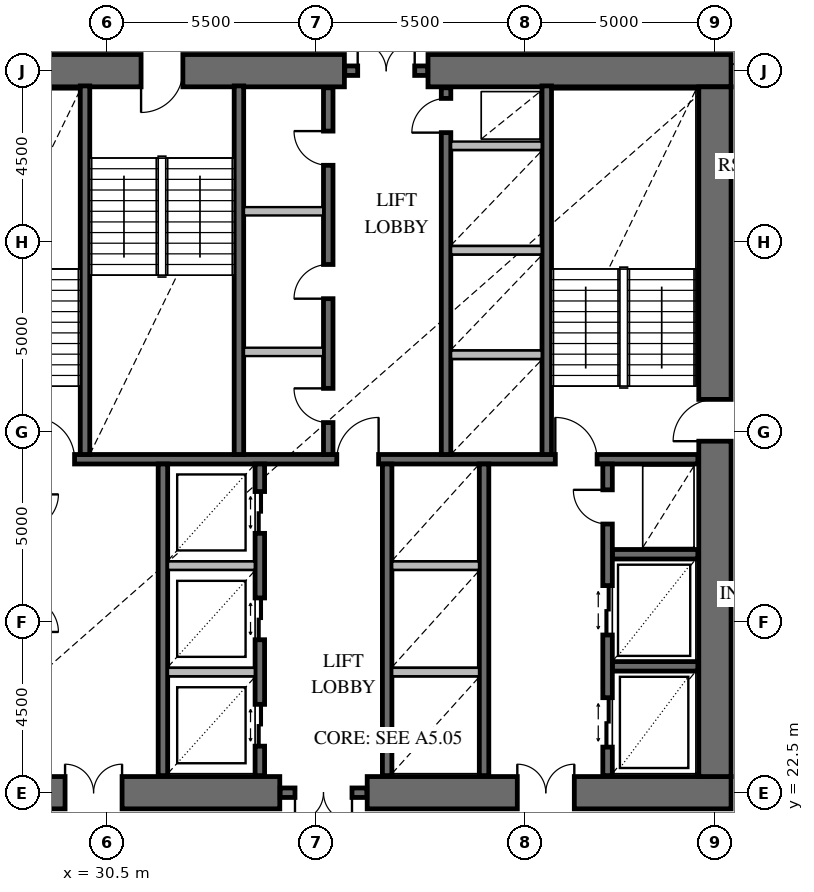
"""IFC4 building model, lengths in metres.
Left out: names, types, materials, properties, quantities, classifications, styles, units other than length and angle.
Written with IfcOpenShell. Run it as: python <this file> out.ifc"""

import sys

from ifc_helpers import new_model, si_unit, direction, frame, frame_2d, origin, place, context, subcontext, project, spatial, rectangle, extrude, element, fill, save


model = new_model("IFC4")
c1 = context("Model", 3, precision=1e-05, world=origin(), true_north=direction((0.0, 1.0)))
c2 = subcontext(c1, "Body", "Model", "MODEL_VIEW")
j1 = project(units=[si_unit("LENGTHUNIT", "METRE"), si_unit("PLANEANGLEUNIT", "RADIAN")], contexts=[c1])
p1 = place(None, origin())
s1 = spatial("IfcSite", under=j1, at=p1, CompositionType="ELEMENT")
p2 = place(p1, origin())
s2 = spatial("IfcBuilding", under=s1, at=p2, CompositionType="ELEMENT")
p3 = place(p2, frame((0.0, 0.0, 83.4)))
s3 = spatial("IfcBuildingStorey", under=s2, at=p3, CompositionType="ELEMENT", Elevation=83.4)
p4 = place(p3, frame((25.075, 22.5, 0.0), z_axis=(0.0, 0.0, 1.0), x_axis=(1.0, 0.0, 0.0)))
e1 = element("IfcWall", 1, at=p4, inside=s3, PredefinedType="SHEAR", context=c2, shape_type="SweptSolid", body=[
    extrude(rectangle(XDim=9.975, YDim=0.85, at=frame_2d((4.988, 0.0))), origin(), (0.0, 0.0, 1.0), 4.2),
])
p5 = place(p4, frame((4.325, 0.0, 0.0)))
e2 = element("IfcOpeningElement", 2, at=p5, cuts=e1, PredefinedType="OPENING", context=c2, shape_type="SweptSolid", body=[
    extrude(rectangle(XDim=1.5, YDim=2.15, at=frame_2d((0.75, 1.075))), frame((0.0, 0.437, 0.0), z_axis=(0.0, -1.0, 0.0), x_axis=(1.0, 0.0, 0.0)), (0.0, 0.0, 1.0), 0.874),
])
p6 = place(p3, frame((37.35, 22.5, 0.0), z_axis=(0.0, 0.0, 1.0), x_axis=(1.0, 0.0, 0.0)))
e3 = element("IfcWall", 3, at=p6, inside=s3, PredefinedType="SHEAR", context=c2, shape_type="SweptSolid", body=[
    extrude(rectangle(XDim=9.575, YDim=0.85, at=frame_2d((4.788, 0.0))), origin(), (0.0, 0.0, 1.0), 4.2),
])
p7 = place(p6, frame((3.95, 0.0, 0.0)))
e4 = element("IfcOpeningElement", 4, at=p7, cuts=e3, PredefinedType="OPENING", context=c2, shape_type="SweptSolid", body=[
    extrude(rectangle(XDim=1.5, YDim=2.15, at=frame_2d((0.75, 1.075))), frame((0.0, 0.437, 0.0), z_axis=(0.0, -1.0, 0.0), x_axis=(1.0, 0.0, 0.0)), (0.0, 0.0, 1.0), 0.874),
])
p8 = place(p3, frame((46.925, 41.5, 0.0), z_axis=(0.0, 0.0, 1.0), x_axis=(-1.0, 0.0, 0.0)))
e5 = element("IfcWall", 5, at=p8, inside=s3, PredefinedType="SHEAR", context=c2, shape_type="SweptSolid", body=[
    extrude(rectangle(XDim=7.975, YDim=0.85, at=frame_2d((3.988, 0.0))), origin(), (0.0, 0.0, 1.0), 4.2),
])
p9 = place(p3, frame((36.75, 41.5, 0.0), z_axis=(0.0, 0.0, 1.0), x_axis=(-1.0, 0.0, 0.0)))
e6 = element("IfcWall", 6, at=p9, inside=s3, PredefinedType="SHEAR", context=c2, shape_type="SweptSolid", body=[
    extrude(rectangle(XDim=11.675, YDim=0.85, at=frame_2d((5.837, 0.0))), origin(), (0.0, 0.0, 1.0), 4.2),
])
p10 = place(p9, frame((4.25, 0.0, 0.0)))
e7 = element("IfcOpeningElement", 7, at=p10, cuts=e6, PredefinedType="OPENING", context=c2, shape_type="SweptSolid", body=[
    extrude(rectangle(XDim=1.1, YDim=2.15, at=frame_2d((0.55, 1.075))), frame((0.0, 0.437, 0.0), z_axis=(0.0, -1.0, 0.0), x_axis=(1.0, 0.0, 0.0)), (0.0, 0.0, 1.0), 0.874),
])
p11 = place(p3, frame((46.5, 22.925, 0.0), z_axis=(0.0, 0.0, 1.0), x_axis=(0.0, 1.0, 0.0)))
e8 = element("IfcWall", 8, at=p11, inside=s3, PredefinedType="SHEAR", context=c2, shape_type="SweptSolid", body=[
    extrude(rectangle(XDim=18.15, YDim=0.85, at=frame_2d((9.075, 0.0))), origin(), (0.0, 0.0, 1.0), 4.2),
])
p12 = place(p11, frame((8.825, 0.0, 0.0)))
e9 = element("IfcOpeningElement", 9, at=p12, cuts=e8, PredefinedType="OPENING", context=c2, shape_type="SweptSolid", body=[
    extrude(rectangle(XDim=1.1, YDim=2.15, at=frame_2d((0.55, 1.075))), frame((0.0, 0.437, 0.0), z_axis=(0.0, -1.0, 0.0), x_axis=(1.0, 0.0, 0.0)), (0.0, 0.0, 1.0), 0.874),
])
p13 = place(p3, frame((35.06, 22.5, 0.0), z_axis=(0.0, 0.0, 1.0), x_axis=(1.0, 0.0, 0.0)))
e10 = element("IfcWall", 10, at=p13, inside=s3, PredefinedType="SOLIDWALL", context=c2, shape_type="SweptSolid", body=[
    extrude(rectangle(XDim=2.28, YDim=0.25, at=frame_2d((1.14, 0.0))), origin(), (0.0, 0.0, 1.0), 4.2),
])
p14 = place(p13, frame((0.39, 0.0, 0.0)))
e11 = element("IfcOpeningElement", 11, at=p14, cuts=e10, PredefinedType="OPENING", context=c2, shape_type="SweptSolid", body=[
    extrude(rectangle(XDim=1.5, YDim=2.15, at=frame_2d((0.75, 1.075))), frame((0.0, 0.137, 0.0), z_axis=(0.0, -1.0, 0.0), x_axis=(1.0, 0.0, 0.0)), (0.0, 0.0, 1.0), 0.274),
])
p15 = place(p3, frame((36.76, 41.5, 0.0), z_axis=(0.0, 0.0, 1.0), x_axis=(1.0, 0.0, 0.0)))
e12 = element("IfcWall", 12, at=p15, inside=s3, PredefinedType="SOLIDWALL", context=c2, shape_type="SweptSolid", body=[
    extrude(rectangle(XDim=2.18, YDim=0.25, at=frame_2d((1.09, 0.0))), origin(), (0.0, 0.0, 1.0), 4.2),
])
p16 = place(p15, frame((0.34, 0.0, 0.0)))
e13 = element("IfcOpeningElement", 13, at=p16, cuts=e12, PredefinedType="OPENING", context=c2, shape_type="SweptSolid", body=[
    extrude(rectangle(XDim=1.5, YDim=2.15, at=frame_2d((0.75, 1.075))), frame((0.0, 0.137, 0.0), z_axis=(0.0, -1.0, 0.0), x_axis=(1.0, 0.0, 0.0)), (0.0, 0.0, 1.0), 0.274),
])
p17 = place(p3, frame((25.95, 31.275, 0.0), z_axis=(0.0, 0.0, 1.0), x_axis=(1.0, 0.0, 0.0)))
e14 = element("IfcWall", 14, at=p17, inside=s3, PredefinedType="SOLIDWALL", context=c2, shape_type="SweptSolid", body=[
    extrude(rectangle(XDim=20.1, YDim=0.25, at=frame_2d((10.05, 0.0))), origin(), (0.0, 0.0, 1.0), 4.2),
])
p18 = place(p17, frame((2.6, 0.0, 0.0)))
e15 = element("IfcOpeningElement", 15, at=p18, cuts=e14, PredefinedType="OPENING", context=c2, shape_type="SweptSolid", body=[
    extrude(rectangle(XDim=1.1, YDim=2.15, at=frame_2d((0.55, 1.075))), frame((0.0, 0.137, 0.0), z_axis=(0.0, -1.0, 0.0), x_axis=(1.0, 0.0, 0.0)), (0.0, 0.0, 1.0), 0.274),
])
p19 = place(p17, frame((10.6, 0.0, 0.0)))
e16 = element("IfcOpeningElement", 16, at=p19, cuts=e14, PredefinedType="OPENING", context=c2, shape_type="SweptSolid", body=[
    extrude(rectangle(XDim=1.1, YDim=2.15, at=frame_2d((0.55, 1.075))), frame((0.0, 0.137, 0.0), z_axis=(0.0, -1.0, 0.0), x_axis=(1.0, 0.0, 0.0)), (0.0, 0.0, 1.0), 0.274),
])
p20 = place(p17, frame((16.35, 0.0, 0.0)))
e17 = element("IfcOpeningElement", 17, at=p20, cuts=e14, PredefinedType="OPENING", context=c2, shape_type="SweptSolid", body=[
    extrude(rectangle(XDim=1.1, YDim=2.15, at=frame_2d((0.55, 1.075))), frame((0.0, 0.137, 0.0), z_axis=(0.0, -1.0, 0.0), x_axis=(1.0, 0.0, 0.0)), (0.0, 0.0, 1.0), 0.274),
])
for number, where, z_axis, x_axis in (
    (18, (29.925, 31.4, 0.0), (0.0, 0.0, 1.0), (0.0, 1.0, 0.0)),
    (19, (33.975, 31.4, 0.0), (0.0, 0.0, 1.0), (0.0, 1.0, 0.0)),
    (20, (42.075, 31.4, 0.0), (0.0, 0.0, 1.0), (0.0, 1.0, 0.0)),
):
    element("IfcWall", number, at=place(p3, frame(where, z_axis=z_axis, x_axis=x_axis)), inside=s3, PredefinedType="SOLIDWALL", context=c2, shape_type="SweptSolid", body=[
        extrude(rectangle(XDim=9.7, YDim=0.25, at=frame_2d((4.85, 0.0))), origin(), (0.0, 0.0, 1.0), 4.2),
    ])
p21 = place(p3, frame((36.325, 31.4, 0.0), z_axis=(0.0, 0.0, 1.0), x_axis=(0.0, 1.0, 0.0)))
e21 = element("IfcWall", 21, at=p21, inside=s3, PredefinedType="SOLIDWALL", context=c2, shape_type="SweptSolid", body=[
    extrude(rectangle(XDim=9.65, YDim=0.25, at=frame_2d((4.825, 0.0))), origin(), (0.0, 0.0, 1.0), 4.2),
])
p22 = place(p21, frame((0.84, 0.0, 0.0)))
e22 = element("IfcOpeningElement", 22, at=p22, cuts=e21, PredefinedType="OPENING", context=c2, shape_type="SweptSolid", body=[
    extrude(rectangle(XDim=0.9, YDim=2.1, at=frame_2d((0.45, 1.05))), frame((0.0, 0.137, 0.0), z_axis=(0.0, -1.0, 0.0), x_axis=(1.0, 0.0, 0.0)), (0.0, 0.0, 1.0), 0.274),
])
p23 = place(p21, frame((4.1, 0.0, 0.0)))
e23 = element("IfcOpeningElement", 23, at=p23, cuts=e21, PredefinedType="OPENING", context=c2, shape_type="SweptSolid", body=[
    extrude(rectangle(XDim=0.9, YDim=2.1, at=frame_2d((0.45, 1.05))), frame((0.0, 0.137, 0.0), z_axis=(0.0, -1.0, 0.0), x_axis=(1.0, 0.0, 0.0)), (0.0, 0.0, 1.0), 0.274),
])
p24 = place(p21, frame((7.61, 0.0, 0.0)))
e24 = element("IfcOpeningElement", 24, at=p24, cuts=e21, PredefinedType="OPENING", context=c2, shape_type="SweptSolid", body=[
    extrude(rectangle(XDim=0.9, YDim=2.1, at=frame_2d((0.45, 1.05))), frame((0.0, 0.137, 0.0), z_axis=(0.0, -1.0, 0.0), x_axis=(1.0, 0.0, 0.0)), (0.0, 0.0, 1.0), 0.274),
])
p25 = place(p3, frame((39.425, 31.4, 0.0), z_axis=(0.0, 0.0, 1.0), x_axis=(0.0, 1.0, 0.0)))
e25 = element("IfcWall", 25, at=p25, inside=s3, PredefinedType="SOLIDWALL", context=c2, shape_type="SweptSolid", body=[
    extrude(rectangle(XDim=9.65, YDim=0.25, at=frame_2d((4.825, 0.0))), origin(), (0.0, 0.0, 1.0), 4.2),
])
p26 = place(p25, frame((8.47, 0.0, 0.0)))
e26 = element("IfcOpeningElement", 26, at=p26, cuts=e25, PredefinedType="OPENING", context=c2, shape_type="SweptSolid", body=[
    extrude(rectangle(XDim=0.9, YDim=2.1, at=frame_2d((0.45, 1.05))), frame((0.0, 0.137, 0.0), z_axis=(0.0, -1.0, 0.0), x_axis=(1.0, 0.0, 0.0)), (0.0, 0.0, 1.0), 0.274),
])
p27 = place(p3, frame((31.975, 22.95, 0.0), z_axis=(0.0, 0.0, 1.0), x_axis=(0.0, 1.0, 0.0)))
e27 = element("IfcWall", 27, at=p27, inside=s3, PredefinedType="SOLIDWALL", context=c2, shape_type="SweptSolid", body=[
    extrude(rectangle(XDim=8.2, YDim=0.25, at=frame_2d((4.1, 0.0))), origin(), (0.0, 0.0, 1.0), 4.2),
])
p28 = place(p3, frame((34.525, 22.95, 0.0), z_axis=(0.0, 0.0, 1.0), x_axis=(0.0, 1.0, 0.0)))
e28 = element("IfcWall", 28, at=p28, inside=s3, PredefinedType="SOLIDWALL", context=c2, shape_type="SweptSolid", body=[
    extrude(rectangle(XDim=8.2, YDim=0.25, at=frame_2d((4.1, 0.0))), origin(), (0.0, 0.0, 1.0), 4.2),
])
p29 = place(p28, frame((0.775, 0.0, 0.0)))
e29 = element("IfcOpeningElement", 29, at=p29, cuts=e28, PredefinedType="OPENING", context=c2, shape_type="SweptSolid", body=[
    extrude(rectangle(XDim=1.1, YDim=2.2, at=frame_2d((0.55, 1.1))), frame((0.0, 0.137, 0.0), z_axis=(0.0, -1.0, 0.0), x_axis=(1.0, 0.0, 0.0)), (0.0, 0.0, 1.0), 0.274),
])
p30 = place(p28, frame((3.575, 0.0, 0.0)))
e30 = element("IfcOpeningElement", 30, at=p30, cuts=e28, PredefinedType="OPENING", context=c2, shape_type="SweptSolid", body=[
    extrude(rectangle(XDim=1.1, YDim=2.2, at=frame_2d((0.55, 1.1))), frame((0.0, 0.137, 0.0), z_axis=(0.0, -1.0, 0.0), x_axis=(1.0, 0.0, 0.0)), (0.0, 0.0, 1.0), 0.274),
])
p31 = place(p28, frame((6.375, 0.0, 0.0)))
e31 = element("IfcOpeningElement", 31, at=p31, cuts=e28, PredefinedType="OPENING", context=c2, shape_type="SweptSolid", body=[
    extrude(rectangle(XDim=1.1, YDim=2.2, at=frame_2d((0.55, 1.1))), frame((0.0, 0.137, 0.0), z_axis=(0.0, -1.0, 0.0), x_axis=(1.0, 0.0, 0.0)), (0.0, 0.0, 1.0), 0.274),
])
for number, where, z_axis, x_axis in (
    (32, (37.875, 22.95, 0.0), (0.0, 0.0, 1.0), (0.0, 1.0, 0.0)),
    (33, (40.425, 22.95, 0.0), (0.0, 0.0, 1.0), (0.0, 1.0, 0.0)),
):
    element("IfcWall", number, at=place(p3, frame(where, z_axis=z_axis, x_axis=x_axis)), inside=s3, PredefinedType="SOLIDWALL", context=c2, shape_type="SweptSolid", body=[
        extrude(rectangle(XDim=8.2, YDim=0.25, at=frame_2d((4.1, 0.0))), origin(), (0.0, 0.0, 1.0), 4.2),
    ])
for number, where, z_axis, x_axis in (
    (34, (43.8, 25.825, 0.0), (0.0, 0.0, 1.0), (1.0, 0.0, 0.0)),
    (35, (43.8, 28.775, 0.0), (0.0, 0.0, 1.0), (1.0, 0.0, 0.0)),
):
    element("IfcWall", number, at=place(p3, frame(where, z_axis=z_axis, x_axis=x_axis)), inside=s3, PredefinedType="SOLIDWALL", context=c2, shape_type="SweptSolid", body=[
        extrude(rectangle(XDim=2.25, YDim=0.25, at=frame_2d((1.125, 0.0))), origin(), (0.0, 0.0, 1.0), 4.2),
    ])
p32 = place(p3, frame((43.675, 22.95, 0.0), z_axis=(0.0, 0.0, 1.0), x_axis=(0.0, 1.0, 0.0)))
e36 = element("IfcWall", 36, at=p32, inside=s3, PredefinedType="SOLIDWALL", context=c2, shape_type="SweptSolid", body=[
    extrude(rectangle(XDim=8.2, YDim=0.25, at=frame_2d((4.1, 0.0))), origin(), (0.0, 0.0, 1.0), 4.2),
])
p33 = place(p32, frame((0.75, 0.0, 0.0)))
e37 = element("IfcOpeningElement", 37, at=p33, cuts=e36, PredefinedType="OPENING", context=c2, shape_type="SweptSolid", body=[
    extrude(rectangle(XDim=1.3, YDim=2.3, at=frame_2d((0.65, 1.15))), frame((0.0, 0.137, 0.0), z_axis=(0.0, -1.0, 0.0), x_axis=(1.0, 0.0, 0.0)), (0.0, 0.0, 1.0), 0.274),
])
p34 = place(p32, frame((3.7, 0.0, 0.0)))
e38 = element("IfcOpeningElement", 38, at=p34, cuts=e36, PredefinedType="OPENING", context=c2, shape_type="SweptSolid", body=[
    extrude(rectangle(XDim=1.3, YDim=2.3, at=frame_2d((0.65, 1.15))), frame((0.0, 0.137, 0.0), z_axis=(0.0, -1.0, 0.0), x_axis=(1.0, 0.0, 0.0)), (0.0, 0.0, 1.0), 0.274),
])
p35 = place(p32, frame((6.62, 0.0, 0.0)))
e39 = element("IfcOpeningElement", 39, at=p35, cuts=e36, PredefinedType="OPENING", context=c2, shape_type="SweptSolid", body=[
    extrude(rectangle(XDim=0.9, YDim=2.1, at=frame_2d((0.45, 1.05))), frame((0.0, 0.137, 0.0), z_axis=(0.0, -1.0, 0.0), x_axis=(1.0, 0.0, 0.0)), (0.0, 0.0, 1.0), 0.274),
])
for number, where, z_axis, x_axis in (
    (40, (34.108, 34.1, 0.0), (0.0, 0.0, 1.0), (1.0, 0.0, 0.0)),
    (41, (34.108, 37.8, 0.0), (0.0, 0.0, 1.0), (1.0, 0.0, 0.0)),
):
    element("IfcWall", number, at=place(p3, frame(where, z_axis=z_axis, x_axis=x_axis)), inside=s3, PredefinedType="PARTITIONING", context=c2, shape_type="SweptSolid", body=[
        extrude(rectangle(XDim=2.084, YDim=0.22, at=frame_2d((1.042, 0.0))), origin(), (0.0, 0.0, 1.0), 3.85),
    ])
for number, where, z_axis, x_axis in (
    (42, (39.558, 34.025, 0.0), (0.0, 0.0, 1.0), (1.0, 0.0, 0.0)),
    (43, (39.558, 36.775, 0.0), (0.0, 0.0, 1.0), (1.0, 0.0, 0.0)),
    (44, (39.558, 39.525, 0.0), (0.0, 0.0, 1.0), (1.0, 0.0, 0.0)),
):
    element("IfcWall", number, at=place(p3, frame(where, z_axis=z_axis, x_axis=x_axis)), inside=s3, PredefinedType="PARTITIONING", context=c2, shape_type="SweptSolid", body=[
        extrude(rectangle(XDim=2.384, YDim=0.22, at=frame_2d((1.192, 0.0))), origin(), (0.0, 0.0, 1.0), 3.85),
    ])
for number, where, z_axis, x_axis in (
    (45, (32.108, 25.675, 0.0), (0.0, 0.0, 1.0), (1.0, 0.0, 0.0)),
    (46, (32.108, 28.475, 0.0), (0.0, 0.0, 1.0), (1.0, 0.0, 0.0)),
):
    element("IfcWall", number, at=place(p3, frame(where, z_axis=z_axis, x_axis=x_axis)), inside=s3, PredefinedType="PARTITIONING", context=c2, shape_type="SweptSolid", body=[
        extrude(rectangle(XDim=2.284, YDim=0.22, at=frame_2d((1.142, 0.0))), origin(), (0.0, 0.0, 1.0), 3.85),
    ])
for number, where, z_axis, x_axis in (
    (47, (38.008, 25.675, 0.0), (0.0, 0.0, 1.0), (1.0, 0.0, 0.0)),
    (48, (38.008, 28.475, 0.0), (0.0, 0.0, 1.0), (1.0, 0.0, 0.0)),
):
    element("IfcWall", number, at=place(p3, frame(where, z_axis=z_axis, x_axis=x_axis)), inside=s3, PredefinedType="PARTITIONING", context=c2, shape_type="SweptSolid", body=[
        extrude(rectangle(XDim=2.284, YDim=0.22, at=frame_2d((1.142, 0.0))), origin(), (0.0, 0.0, 1.0), 3.85),
    ])
p36 = place(p12, origin())
e49 = element("IfcDoor", 49, at=p36, inside=s3, OperationType="SINGLE_SWING_LEFT", PredefinedType="USERDEFINED", context=c2, shape_type="SweptSolid", body=[
    extrude(rectangle(XDim=1.1, YDim=2.15, at=frame_2d((0.55, 1.075))), frame((0.0, 0.025, 0.0), z_axis=(0.0, -1.0, 0.0), x_axis=(1.0, 0.0, 0.0)), (0.0, 0.0, 1.0), 0.05),
])
fill(e9, e49)
p37 = place(p10, origin())
e50 = element("IfcDoor", 50, at=p37, inside=s3, OperationType="SINGLE_SWING_RIGHT", PredefinedType="USERDEFINED", context=c2, shape_type="SweptSolid", body=[
    extrude(rectangle(XDim=1.1, YDim=2.15, at=frame_2d((0.55, 1.075))), frame((0.0, 0.025, 0.0), z_axis=(0.0, -1.0, 0.0), x_axis=(1.0, 0.0, 0.0)), (0.0, 0.0, 1.0), 0.05),
])
fill(e7, e50)
p38 = place(p5, origin())
e51 = element("IfcDoor", 51, at=p38, inside=s3, OperationType="DOUBLE_DOOR_SINGLE_SWING", PredefinedType="DOOR", context=c2, shape_type="SweptSolid", body=[
    extrude(rectangle(XDim=1.5, YDim=2.15, at=frame_2d((0.75, 1.075))), frame((0.0, 0.025, 0.0), z_axis=(0.0, -1.0, 0.0), x_axis=(1.0, 0.0, 0.0)), (0.0, 0.0, 1.0), 0.05),
])
fill(e2, e51)
p39 = place(p7, origin())
e52 = element("IfcDoor", 52, at=p39, inside=s3, OperationType="DOUBLE_DOOR_SINGLE_SWING", PredefinedType="DOOR", context=c2, shape_type="SweptSolid", body=[
    extrude(rectangle(XDim=1.5, YDim=2.15, at=frame_2d((0.75, 1.075))), frame((0.0, 0.025, 0.0), z_axis=(0.0, -1.0, 0.0), x_axis=(1.0, 0.0, 0.0)), (0.0, 0.0, 1.0), 0.05),
])
fill(e4, e52)
p40 = place(p14, frame((1.5, 0.0, 0.0), z_axis=(0.0, 0.0, 1.0), x_axis=(-1.0, 0.0, 0.0)))
e53 = element("IfcDoor", 53, at=p40, inside=s3, OperationType="DOUBLE_DOOR_SINGLE_SWING", PredefinedType="DOOR", context=c2, shape_type="SweptSolid", body=[
    extrude(rectangle(XDim=1.5, YDim=2.15, at=frame_2d((0.75, 1.075))), frame((0.0, 0.025, 0.0), z_axis=(0.0, -1.0, 0.0), x_axis=(1.0, 0.0, 0.0)), (0.0, 0.0, 1.0), 0.05),
])
fill(e11, e53)
p41 = place(p16, origin())
e54 = element("IfcDoor", 54, at=p41, inside=s3, OperationType="DOUBLE_DOOR_SINGLE_SWING", PredefinedType="DOOR", context=c2, shape_type="SweptSolid", body=[
    extrude(rectangle(XDim=1.5, YDim=2.15, at=frame_2d((0.75, 1.075))), frame((0.0, 0.025, 0.0), z_axis=(0.0, -1.0, 0.0), x_axis=(1.0, 0.0, 0.0)), (0.0, 0.0, 1.0), 0.05),
])
fill(e13, e54)
p42 = place(p18, origin())
e55 = element("IfcDoor", 55, at=p42, inside=s3, OperationType="SINGLE_SWING_LEFT", PredefinedType="USERDEFINED", context=c2, shape_type="SweptSolid", body=[
    extrude(rectangle(XDim=1.1, YDim=2.15, at=frame_2d((0.55, 1.075))), frame((0.0, 0.025, 0.0), z_axis=(0.0, -1.0, 0.0), x_axis=(1.0, 0.0, 0.0)), (0.0, 0.0, 1.0), 0.05),
])
fill(e15, e55)
p43 = place(p19, origin())
e56 = element("IfcDoor", 56, at=p43, inside=s3, OperationType="SINGLE_SWING_RIGHT", PredefinedType="USERDEFINED", context=c2, shape_type="SweptSolid", body=[
    extrude(rectangle(XDim=1.1, YDim=2.15, at=frame_2d((0.55, 1.075))), frame((0.0, 0.025, 0.0), z_axis=(0.0, -1.0, 0.0), x_axis=(1.0, 0.0, 0.0)), (0.0, 0.0, 1.0), 0.05),
])
fill(e16, e56)
p44 = place(p20, origin())
e57 = element("IfcDoor", 57, at=p44, inside=s3, OperationType="SINGLE_SWING_LEFT", PredefinedType="USERDEFINED", context=c2, shape_type="SweptSolid", body=[
    extrude(rectangle(XDim=1.1, YDim=2.15, at=frame_2d((0.55, 1.075))), frame((0.0, 0.025, 0.0), z_axis=(0.0, -1.0, 0.0), x_axis=(1.0, 0.0, 0.0)), (0.0, 0.0, 1.0), 0.05),
])
fill(e17, e57)
p45 = place(p22, origin())
e58 = element("IfcDoor", 58, at=p45, inside=s3, OperationType="SINGLE_SWING_RIGHT", PredefinedType="DOOR", context=c2, shape_type="SweptSolid", body=[
    extrude(rectangle(XDim=0.9, YDim=2.1, at=frame_2d((0.45, 1.05))), frame((0.0, 0.025, 0.0), z_axis=(0.0, -1.0, 0.0), x_axis=(1.0, 0.0, 0.0)), (0.0, 0.0, 1.0), 0.05),
])
fill(e22, e58)
p46 = place(p23, origin())
e59 = element("IfcDoor", 59, at=p46, inside=s3, OperationType="SINGLE_SWING_LEFT", PredefinedType="DOOR", context=c2, shape_type="SweptSolid", body=[
    extrude(rectangle(XDim=0.9, YDim=2.1, at=frame_2d((0.45, 1.05))), frame((0.0, 0.025, 0.0), z_axis=(0.0, -1.0, 0.0), x_axis=(1.0, 0.0, 0.0)), (0.0, 0.0, 1.0), 0.05),
])
fill(e23, e59)
p47 = place(p24, origin())
e60 = element("IfcDoor", 60, at=p47, inside=s3, OperationType="SINGLE_SWING_RIGHT", PredefinedType="DOOR", context=c2, shape_type="SweptSolid", body=[
    extrude(rectangle(XDim=0.9, YDim=2.1, at=frame_2d((0.45, 1.05))), frame((0.0, 0.025, 0.0), z_axis=(0.0, -1.0, 0.0), x_axis=(1.0, 0.0, 0.0)), (0.0, 0.0, 1.0), 0.05),
])
fill(e24, e60)
p48 = place(p26, origin())
e61 = element("IfcDoor", 61, at=p48, inside=s3, OperationType="SINGLE_SWING_LEFT", PredefinedType="DOOR", context=c2, shape_type="SweptSolid", body=[
    extrude(rectangle(XDim=0.9, YDim=2.1, at=frame_2d((0.45, 1.05))), frame((0.0, 0.025, 0.0), z_axis=(0.0, -1.0, 0.0), x_axis=(1.0, 0.0, 0.0)), (0.0, 0.0, 1.0), 0.05),
])
fill(e26, e61)
p49 = place(p29, frame((1.1, 0.0, 0.0), z_axis=(0.0, 0.0, 1.0), x_axis=(-1.0, 0.0, 0.0)))
e62 = element("IfcDoor", 62, at=p49, inside=s3, OperationType="DOUBLE_DOOR_SLIDING", PredefinedType="DOOR", context=c2, shape_type="SweptSolid", body=[
    extrude(rectangle(XDim=1.1, YDim=2.2, at=frame_2d((0.55, 1.1))), frame((0.0, 0.025, 0.0), z_axis=(0.0, -1.0, 0.0), x_axis=(1.0, 0.0, 0.0)), (0.0, 0.0, 1.0), 0.05),
])
fill(e29, e62)
p50 = place(p30, frame((1.1, 0.0, 0.0), z_axis=(0.0, 0.0, 1.0), x_axis=(-1.0, 0.0, 0.0)))
e63 = element("IfcDoor", 63, at=p50, inside=s3, OperationType="DOUBLE_DOOR_SLIDING", PredefinedType="DOOR", context=c2, shape_type="SweptSolid", body=[
    extrude(rectangle(XDim=1.1, YDim=2.2, at=frame_2d((0.55, 1.1))), frame((0.0, 0.025, 0.0), z_axis=(0.0, -1.0, 0.0), x_axis=(1.0, 0.0, 0.0)), (0.0, 0.0, 1.0), 0.05),
])
fill(e30, e63)
p51 = place(p31, frame((1.1, 0.0, 0.0), z_axis=(0.0, 0.0, 1.0), x_axis=(-1.0, 0.0, 0.0)))
e64 = element("IfcDoor", 64, at=p51, inside=s3, OperationType="DOUBLE_DOOR_SLIDING", PredefinedType="DOOR", context=c2, shape_type="SweptSolid", body=[
    extrude(rectangle(XDim=1.1, YDim=2.2, at=frame_2d((0.55, 1.1))), frame((0.0, 0.025, 0.0), z_axis=(0.0, -1.0, 0.0), x_axis=(1.0, 0.0, 0.0)), (0.0, 0.0, 1.0), 0.05),
])
fill(e31, e64)
p52 = place(p33, origin())
e65 = element("IfcDoor", 65, at=p52, inside=s3, OperationType="DOUBLE_DOOR_SLIDING", PredefinedType="DOOR", context=c2, shape_type="SweptSolid", body=[
    extrude(rectangle(XDim=1.3, YDim=2.3, at=frame_2d((0.65, 1.15))), frame((0.0, 0.025, 0.0), z_axis=(0.0, -1.0, 0.0), x_axis=(1.0, 0.0, 0.0)), (0.0, 0.0, 1.0), 0.05),
])
fill(e37, e65)
p53 = place(p34, origin())
e66 = element("IfcDoor", 66, at=p53, inside=s3, OperationType="DOUBLE_DOOR_SLIDING", PredefinedType="DOOR", context=c2, shape_type="SweptSolid", body=[
    extrude(rectangle(XDim=1.3, YDim=2.3, at=frame_2d((0.65, 1.15))), frame((0.0, 0.025, 0.0), z_axis=(0.0, -1.0, 0.0), x_axis=(1.0, 0.0, 0.0)), (0.0, 0.0, 1.0), 0.05),
])
fill(e38, e66)
p54 = place(p35, origin())
e67 = element("IfcDoor", 67, at=p54, inside=s3, OperationType="SINGLE_SWING_RIGHT", PredefinedType="DOOR", context=c2, shape_type="SweptSolid", body=[
    extrude(rectangle(XDim=0.9, YDim=2.1, at=frame_2d((0.45, 1.05))), frame((0.0, 0.025, 0.0), z_axis=(0.0, -1.0, 0.0), x_axis=(1.0, 0.0, 0.0)), (0.0, 0.0, 1.0), 0.05),
])
fill(e39, e67)
save(model, sys.argv[1])
